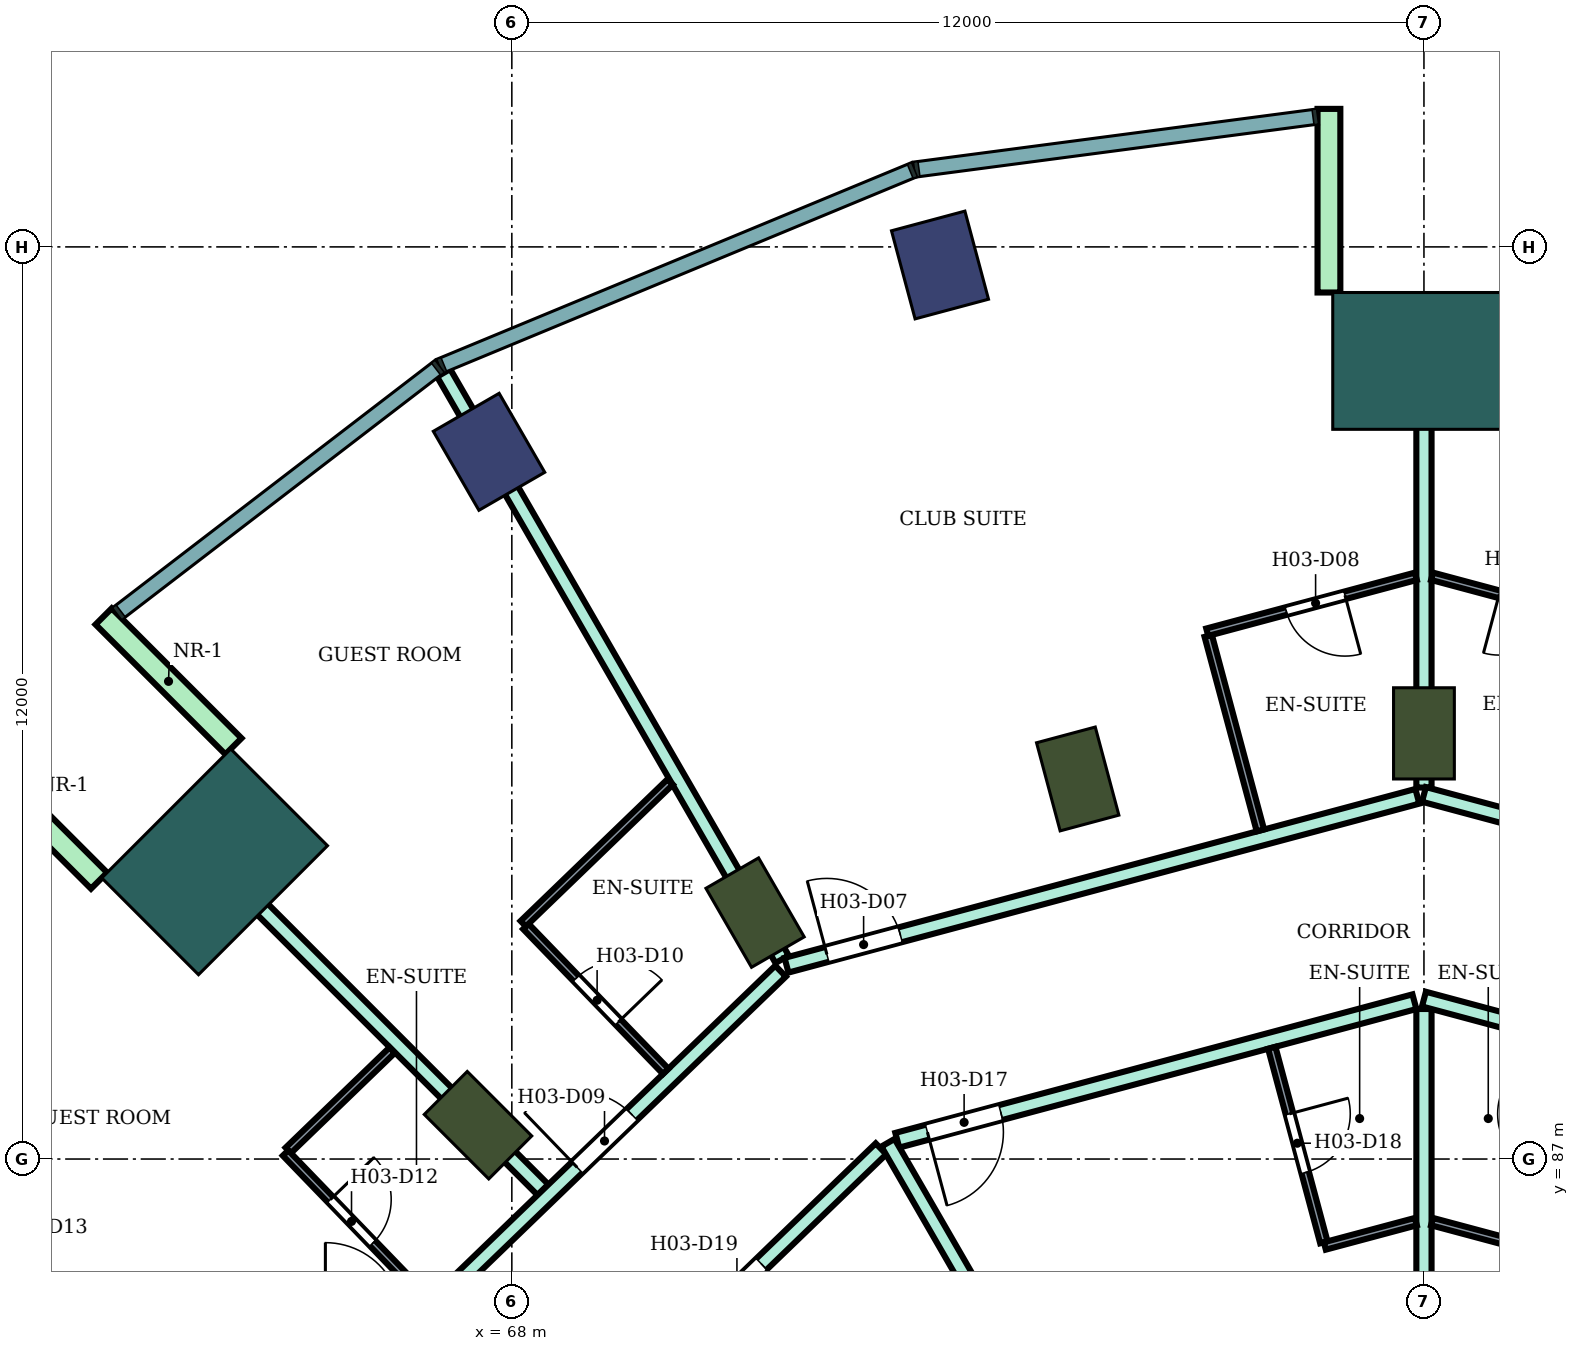
"""IFC4 building model, lengths in metres.
Left out: names, types, materials, properties, quantities, classifications, styles, units other than length and angle.
Written with IfcOpenShell. Run it as: python <this file> out.ifc"""

import sys

from ifc_helpers import new_model, si_unit, direction, frame, frame_2d, origin, origin_2d, place, context, subcontext, project, spatial, rectangle, extrude, element, fill, save


model = new_model("IFC4")
c1 = context("Model", 3, precision=1e-05, world=origin(), true_north=direction((0.0, 1.0)))
c2 = subcontext(c1, "Body", "Model", "MODEL_VIEW")
j1 = project(units=[si_unit("LENGTHUNIT", "METRE"), si_unit("PLANEANGLEUNIT", "RADIAN")], contexts=[c1])
p1 = place(None, origin())
s1 = spatial("IfcSite", under=j1, at=p1, CompositionType="ELEMENT")
p2 = place(p1, origin())
s2 = spatial("IfcBuilding", under=s1, at=p2, CompositionType="ELEMENT")
p3 = place(p2, frame((0.0, 0.0, 59.2)))
s3 = spatial("IfcBuildingStorey", under=s2, at=p3, CompositionType="ELEMENT", Elevation=59.2)
for number, where, z_axis, x_axis in (
    (1, (73.633, 98.762, 0.0), (0.0, 0.0, 1.0), (-0.259, 0.966, 0.0)),
    (2, (67.7, 96.304, 0.0), (0.0, 0.0, 1.0), (-0.5, 0.866, 0.0)),
):
    element("IfcColumn", number, at=place(p3, frame(where, z_axis=z_axis, x_axis=x_axis)), inside=s3, PredefinedType="COLUMN", context=c2, shape_type="SweptSolid", body=[
        extrude(rectangle(XDim=1.2, YDim=1.0, at=origin_2d()), origin(), (0.0, 0.0, 1.0), 3.8),
    ])
for number, where, z_axis, x_axis in (
    (3, (80.0, 92.6, 0.0), (0.0, 0.0, 1.0), (0.0, 1.0, 0.0)),
    (4, (75.445, 92.0, 0.0), (0.0, 0.0, 1.0), (-0.259, 0.966, 0.0)),
    (5, (71.2, 90.242, 0.0), (0.0, 0.0, 1.0), (-0.5, 0.866, 0.0)),
    (6, (67.555, 87.445, 0.0), (0.0, 0.0, 1.0), (-0.707, 0.707, 0.0)),
):
    element("IfcColumn", number, at=place(p3, frame(where, z_axis=z_axis, x_axis=x_axis)), inside=s3, PredefinedType="COLUMN", context=c2, shape_type="SweptSolid", body=[
        extrude(rectangle(XDim=1.2, YDim=0.8, at=origin_2d()), origin(), (0.0, 0.0, 1.0), 3.8),
    ])
for number, where, z_axis, x_axis in (
    (7, (80.0, 97.5, 0.0), (0.0, 0.0, 1.0), (0.0, 1.0, 0.0)),
    (8, (64.09, 90.91, 0.0), (0.0, 0.0, 1.0), (-0.707, 0.707, 0.0)),
):
    element("IfcColumn", number, at=place(p3, frame(where, z_axis=z_axis, x_axis=x_axis)), inside=s3, PredefinedType="COLUMN", context=c2, shape_type="SweptSolid", body=[
        extrude(rectangle(XDim=1.8, YDim=2.4, at=origin_2d()), origin(), (0.0, 0.0, 1.0), 3.8),
    ])
for number, where, z_axis, x_axis in (
    (9, (78.75, 98.4, 0.0), (0.0, 0.0, 1.0), (0.0, 1.0, 0.0)),
    (10, (64.338, 92.43, 0.0), (0.0, 0.0, 1.0), (-0.707, 0.707, 0.0)),
    (11, (62.57, 90.662, 0.0), (0.0, 0.0, 1.0), (-0.707, 0.707, 0.0)),
):
    element("IfcWall", number, at=place(p3, frame(where, z_axis=z_axis, x_axis=x_axis)), inside=s3, PredefinedType="NOTDEFINED", context=c2, shape_type="SweptSolid", body=[
        extrude(rectangle(XDim=2.416, YDim=0.3, at=frame_2d((1.208, 0.0))), origin(), (0.0, 0.0, 1.0), 3.8),
    ])
p4 = place(p3, frame((63.598, 91.408, 0.0), z_axis=(0.0, 0.0, 1.0), x_axis=(0.706999146394, -0.707214399597, 0.0)))
e12 = element("IfcWall", 12, at=p4, inside=s3, PredefinedType="PARTITIONING", context=c2, shape_type="SweptSolid", body=[
    extrude(rectangle(XDim=6.805, YDim=0.2, at=frame_2d((3.403, 0.0))), origin(), (0.0, 0.0, 1.0), 3.35),
])
p5 = place(p3, frame((66.797, 84.9, 0.0), z_axis=(0.0, 0.0, 1.0), x_axis=(0.719692092412, 0.694293376116, 0.0)))
e13 = element("IfcWall", 13, at=p5, inside=s3, PredefinedType="PARTITIONING", context=c2, shape_type="SweptSolid", body=[
    extrude(rectangle(XDim=6.584, YDim=0.2, at=frame_2d((3.292, 0.0))), origin(), (0.0, 0.0, 1.0), 3.35),
])
p6 = place(p5, frame((2.866, 0.0, 0.0)))
e14 = element("IfcOpeningElement", 14, at=p6, cuts=e13, PredefinedType="OPENING", context=c2, shape_type="SweptSolid", body=[
    extrude(rectangle(XDim=1.0, YDim=2.1, at=frame_2d((0.5, 1.05))), frame((0.0, 0.11, 0.0), z_axis=(0.0, -1.0, 0.0), x_axis=(1.0, 0.0, 0.0)), (0.0, 0.0, 1.0), 0.22),
])
p7 = place(p3, frame((67.103, 97.342, 0.0), z_axis=(0.0, 0.0, 1.0), x_axis=(0.499906738326, -0.866079241742, 0.0)))
e15 = element("IfcWall", 15, at=p7, inside=s3, PredefinedType="PARTITIONING", context=c2, shape_type="SweptSolid", body=[
    extrude(rectangle(XDim=8.907, YDim=0.2, at=frame_2d((4.454, 0.0))), origin(), (0.0, 0.0, 1.0), 3.35),
])
p8 = place(p3, frame((68.987, 83.4, 0.0), z_axis=(0.0, 0.0, 1.0), x_axis=(0.719547721855, 0.694442996922, 0.0)))
e16 = element("IfcWall", 16, at=p8, inside=s3, PredefinedType="PARTITIONING", context=c2, shape_type="SweptSolid", body=[
    extrude(rectangle(XDim=5.378, YDim=0.2, at=frame_2d((2.689, 0.0))), origin(), (0.0, 0.0, 1.0), 3.35),
])
p9 = place(p8, frame((2.294, 0.0, 0.0)))
e17 = element("IfcOpeningElement", 17, at=p9, cuts=e16, PredefinedType="OPENING", context=c2, shape_type="SweptSolid", body=[
    extrude(rectangle(XDim=0.9, YDim=2.1, at=frame_2d((0.45, 1.05))), frame((0.0, 0.11, 0.0), z_axis=(0.0, -1.0, 0.0), x_axis=(1.0, 0.0, 0.0)), (0.0, 0.0, 1.0), 0.22),
])
p10 = place(p3, frame((71.614, 89.55, 0.0), z_axis=(0.0, 0.0, 1.0), x_axis=(0.965967958589, 0.258661753994, 0.0)))
e18 = element("IfcWall", 18, at=p10, inside=s3, PredefinedType="PARTITIONING", context=c2, shape_type="SweptSolid", body=[
    extrude(rectangle(XDim=8.592, YDim=0.2, at=frame_2d((4.296, 0.0))), origin(), (0.0, 0.0, 1.0), 3.35),
])
p11 = place(p10, frame((0.55, 0.0, 0.0)))
e19 = element("IfcOpeningElement", 19, at=p11, cuts=e18, PredefinedType="OPENING", context=c2, shape_type="SweptSolid", body=[
    extrude(rectangle(XDim=1.0, YDim=2.1, at=frame_2d((0.5, 1.05))), frame((0.0, 0.11, 0.0), z_axis=(0.0, -1.0, 0.0), x_axis=(1.0, 0.0, 0.0)), (0.0, 0.0, 1.0), 0.22),
])
p12 = place(p3, frame((73.071, 87.247, 0.0), z_axis=(0.0, 0.0, 1.0), x_axis=(0.965931651205, 0.258797305243, 0.0)))
e20 = element("IfcWall", 20, at=p12, inside=s3, PredefinedType="PARTITIONING", context=c2, shape_type="SweptSolid", body=[
    extrude(rectangle(XDim=7.043, YDim=0.2, at=frame_2d((3.521, 0.0))), origin(), (0.0, 0.0, 1.0), 3.35),
])
p13 = place(p12, frame((0.41, 0.0, 0.0)))
e21 = element("IfcOpeningElement", 21, at=p13, cuts=e20, PredefinedType="OPENING", context=c2, shape_type="SweptSolid", body=[
    extrude(rectangle(XDim=1.0, YDim=2.1, at=frame_2d((0.5, 1.05))), frame((0.0, 0.11, 0.0), z_axis=(0.0, -1.0, 0.0), x_axis=(1.0, 0.0, 0.0)), (0.0, 0.0, 1.0), 0.22),
])
p14 = place(p3, frame((72.949, 87.214, 0.0), z_axis=(0.0, 0.0, 1.0), x_axis=(0.499927021214, -0.866067534006, 0.0)))
e22 = element("IfcWall", 22, at=p14, inside=s3, PredefinedType="PARTITIONING", context=c2, shape_type="SweptSolid", body=[
    extrude(rectangle(XDim=6.405, YDim=0.2, at=frame_2d((3.203, 0.0))), origin(), (0.0, 0.0, 1.0), 3.35),
])
p15 = place(p3, frame((80.0, 82.699, 0.0), z_axis=(0.0, 0.0, 1.0), x_axis=(0.0, 1.0, 0.0)))
e23 = element("IfcWall", 23, at=p15, inside=s3, PredefinedType="PARTITIONING", context=c2, shape_type="SweptSolid", body=[
    extrude(rectangle(XDim=6.275, YDim=0.2, at=frame_2d((3.138, 0.0))), origin(), (0.0, 0.0, 1.0), 3.35),
])
p16 = place(p3, frame((80.0, 89.104, 0.0), z_axis=(0.0, 0.0, 1.0), x_axis=(0.965856548257, -0.259077455964, 0.0)))
e24 = element("IfcWall", 24, at=p16, inside=s3, PredefinedType="PARTITIONING", context=c2, shape_type="SweptSolid", body=[
    extrude(rectangle(XDim=7.173, YDim=0.2, at=frame_2d((3.586, 0.0))), origin(), (0.0, 0.0, 1.0), 3.35),
])
p17 = place(p16, frame((5.763, 0.0, 0.0)))
e25 = element("IfcOpeningElement", 25, at=p17, cuts=e24, PredefinedType="OPENING", context=c2, shape_type="SweptSolid", body=[
    extrude(rectangle(XDim=1.0, YDim=2.1, at=frame_2d((0.5, 1.05))), frame((0.0, 0.11, 0.0), z_axis=(0.0, -1.0, 0.0), x_axis=(1.0, 0.0, 0.0)), (0.0, 0.0, 1.0), 0.22),
])
p18 = place(p3, frame((80.0, 91.887, 0.0), z_axis=(0.0, 0.0, 1.0), x_axis=(0.0, 1.0, 0.0)))
e26 = element("IfcWall", 26, at=p18, inside=s3, PredefinedType="PARTITIONING", context=c2, shape_type="SweptSolid", body=[
    extrude(rectangle(XDim=6.312, YDim=0.2, at=frame_2d((3.156, 0.0))), origin(), (0.0, 0.0, 1.0), 3.35),
])
p19 = place(p3, frame((80.0, 91.797, 0.0), z_axis=(0.0, 0.0, 1.0), x_axis=(0.965857042792, -0.259075612301, 0.0)))
e27 = element("IfcWall", 27, at=p19, inside=s3, PredefinedType="PARTITIONING", context=c2, shape_type="SweptSolid", body=[
    extrude(rectangle(XDim=8.602, YDim=0.2, at=frame_2d((4.301, 0.0))), origin(), (0.0, 0.0, 1.0), 3.35),
])
p20 = place(p19, frame((4.877, 0.0, 0.0)))
e28 = element("IfcOpeningElement", 28, at=p20, cuts=e27, PredefinedType="OPENING", context=c2, shape_type="SweptSolid", body=[
    extrude(rectangle(XDim=1.0, YDim=2.1, at=frame_2d((0.5, 1.05))), frame((0.0, 0.11, 0.0), z_axis=(0.0, -1.0, 0.0), x_axis=(1.0, 0.0, 0.0)), (0.0, 0.0, 1.0), 0.22),
])
p21 = place(p19, frame((2.817, 0.0, 0.0)))
e29 = element("IfcOpeningElement", 29, at=p21, cuts=e27, PredefinedType="OPENING", context=c2, shape_type="SweptSolid", body=[
    extrude(rectangle(XDim=1.0, YDim=2.1, at=frame_2d((0.5, 1.05))), frame((0.0, 0.11, 0.0), z_axis=(0.0, -1.0, 0.0), x_axis=(1.0, 0.0, 0.0)), (0.0, 0.0, 1.0), 0.22),
])
p22 = place(p3, frame((57.659, 87.899, 0.0), z_axis=(0.0, 0.0, 1.0), x_axis=(0.86602264145, -0.500004784474, 0.0)))
e30 = element("IfcWall", 30, at=p22, inside=s3, PredefinedType="PARTITIONING", context=c2, shape_type="SweptSolid", body=[
    extrude(rectangle(XDim=8.708, YDim=0.1, at=frame_2d((4.354, 0.0))), origin(), (0.0, 0.0, 1.0), 3.35),
])
p23 = place(p22, frame((3.929, 0.0, 0.0)))
e31 = element("IfcOpeningElement", 31, at=p23, cuts=e30, PredefinedType="OPENING", context=c2, shape_type="SweptSolid", body=[
    extrude(rectangle(XDim=0.9, YDim=2.1, at=frame_2d((0.45, 1.05))), frame((0.0, 0.06, 0.0), z_axis=(0.0, -1.0, 0.0), x_axis=(1.0, 0.0, 0.0)), (0.0, 0.0, 1.0), 0.12),
])
p24 = place(p3, frame((65.059, 87.114, 0.0), z_axis=(0.0, 0.0, 1.0), x_axis=(0.719715847356, 0.694268751324, 0.0)))
e32 = element("IfcWall", 32, at=p24, inside=s3, PredefinedType="PARTITIONING", context=c2, shape_type="SweptSolid", body=[
    extrude(rectangle(XDim=1.9, YDim=0.1, at=frame_2d((0.95, 0.0))), origin(), (0.0, 0.0, 1.0), 3.35),
])
p25 = place(p3, frame((65.023, 87.079, 0.0), z_axis=(0.0, 0.0, 1.0), x_axis=(0.694287838235, -0.719697434815, 0.0)))
e33 = element("IfcWall", 33, at=p25, inside=s3, PredefinedType="PARTITIONING", context=c2, shape_type="SweptSolid", body=[
    extrude(rectangle(XDim=2.7, YDim=0.1, at=frame_2d((1.35, 0.0))), origin(), (0.0, 0.0, 1.0), 3.35),
])
p26 = place(p25, frame((0.85, 0.0, 0.0)))
e34 = element("IfcOpeningElement", 34, at=p26, cuts=e33, PredefinedType="OPENING", context=c2, shape_type="SweptSolid", body=[
    extrude(rectangle(XDim=0.8, YDim=2.1, at=frame_2d((0.4, 1.05))), frame((0.0, 0.06, 0.0), z_axis=(0.0, -1.0, 0.0), x_axis=(1.0, 0.0, 0.0)), (0.0, 0.0, 1.0), 0.12),
])
p27 = place(p3, frame((68.185, 90.06, 0.0), z_axis=(0.0, 0.0, 1.0), x_axis=(0.69446127412, -0.719530081892, 0.0)))
e35 = element("IfcWall", 35, at=p27, inside=s3, PredefinedType="PARTITIONING", context=c2, shape_type="SweptSolid", body=[
    extrude(rectangle(XDim=2.649, YDim=0.1, at=frame_2d((1.324, 0.0))), origin(), (0.0, 0.0, 1.0), 3.35),
])
p28 = place(p27, frame((0.95, 0.0, 0.0)))
e36 = element("IfcOpeningElement", 36, at=p28, cuts=e35, PredefinedType="OPENING", context=c2, shape_type="SweptSolid", body=[
    extrude(rectangle(XDim=0.8, YDim=2.1, at=frame_2d((0.4, 1.05))), frame((0.0, 0.06, 0.0), z_axis=(0.0, -1.0, 0.0), x_axis=(1.0, 0.0, 0.0)), (0.0, 0.0, 1.0), 0.12),
])
p29 = place(p3, frame((68.15, 90.096, 0.0), z_axis=(0.0, 0.0, 1.0), x_axis=(0.719667544954, 0.694318820672, 0.0)))
e37 = element("IfcWall", 37, at=p29, inside=s3, PredefinedType="PARTITIONING", context=c2, shape_type="SweptSolid", body=[
    extrude(rectangle(XDim=2.687, YDim=0.1, at=frame_2d((1.344, 0.0))), origin(), (0.0, 0.0, 1.0), 3.35),
])
p30 = place(p3, frame((77.162, 93.883, 0.0), z_axis=(0.0, 0.0, 1.0), x_axis=(0.258998589493, -0.965877699629, 0.0)))
e38 = element("IfcWall", 38, at=p30, inside=s3, PredefinedType="PARTITIONING", context=c2, shape_type="SweptSolid", body=[
    extrude(rectangle(XDim=2.65, YDim=0.1, at=frame_2d((1.325, 0.0))), origin(), (0.0, 0.0, 1.0), 3.35),
])
p31 = place(p3, frame((77.149, 93.931, 0.0), z_axis=(0.0, 0.0, 1.0), x_axis=(0.965916219953, 0.258854893776, 0.0)))
e39 = element("IfcWall", 39, at=p31, inside=s3, PredefinedType="PARTITIONING", context=c2, shape_type="SweptSolid", body=[
    extrude(rectangle(XDim=2.842, YDim=0.1, at=frame_2d((1.421, 0.0))), origin(), (0.0, 0.0, 1.0), 3.35),
])
p32 = place(p31, frame((1.076, 0.0, 0.0)))
e40 = element("IfcOpeningElement", 40, at=p32, cuts=e39, PredefinedType="OPENING", context=c2, shape_type="SweptSolid", body=[
    extrude(rectangle(XDim=0.8, YDim=2.1, at=frame_2d((0.4, 1.05))), frame((0.0, 0.06, 0.0), z_axis=(0.0, -1.0, 0.0), x_axis=(1.0, 0.0, 0.0)), (0.0, 0.0, 1.0), 0.12),
])
p33 = place(p3, frame((77.998, 88.463, 0.0), z_axis=(0.0, 0.0, 1.0), x_axis=(0.258677737588, -0.965963678446, 0.0)))
e41 = element("IfcWall", 41, at=p33, inside=s3, PredefinedType="PARTITIONING", context=c2, shape_type="SweptSolid", body=[
    extrude(rectangle(XDim=2.649, YDim=0.1, at=frame_2d((1.325, 0.0))), origin(), (0.0, 0.0, 1.0), 3.35),
])
p34 = place(p33, frame((0.9, 0.0, 0.0)))
e42 = element("IfcOpeningElement", 42, at=p34, cuts=e41, PredefinedType="OPENING", context=c2, shape_type="SweptSolid", body=[
    extrude(rectangle(XDim=0.8, YDim=2.1, at=frame_2d((0.4, 1.05))), frame((0.0, 0.06, 0.0), z_axis=(0.0, -1.0, 0.0), x_axis=(1.0, 0.0, 0.0)), (0.0, 0.0, 1.0), 0.12),
])
p35 = place(p3, frame((78.696, 85.856, 0.0), z_axis=(0.0, 0.0, 1.0), x_axis=(0.966002513606, 0.258532674351, 0.0)))
e43 = element("IfcWall", 43, at=p35, inside=s3, PredefinedType="PARTITIONING", context=c2, shape_type="SweptSolid", body=[
    extrude(rectangle(XDim=1.24, YDim=0.1, at=frame_2d((0.62, 0.0))), origin(), (0.0, 0.0, 1.0), 3.35),
])
p36 = place(p3, frame((80.106, 86.177, 0.0), z_axis=(0.0, 0.0, 1.0), x_axis=(0.966002973184, -0.258530957139, 0.0)))
e44 = element("IfcWall", 44, at=p36, inside=s3, PredefinedType="PARTITIONING", context=c2, shape_type="SweptSolid", body=[
    extrude(rectangle(XDim=1.19, YDim=0.1, at=frame_2d((0.595, 0.0))), origin(), (0.0, 0.0, 1.0), 3.35),
])
p37 = place(p3, frame((80.106, 94.667, 0.0), z_axis=(0.0, 0.0, 1.0), x_axis=(0.965904298007, -0.258899376382, 0.0)))
e45 = element("IfcWall", 45, at=p37, inside=s3, PredefinedType="PARTITIONING", context=c2, shape_type="SweptSolid", body=[
    extrude(rectangle(XDim=2.69, YDim=0.1, at=frame_2d((1.345, 0.0))), origin(), (0.0, 0.0, 1.0), 3.35),
])
p38 = place(p37, frame((0.915, 0.0, 0.0)))
e46 = element("IfcOpeningElement", 46, at=p38, cuts=e45, PredefinedType="OPENING", context=c2, shape_type="SweptSolid", body=[
    extrude(rectangle(XDim=0.8, YDim=2.1, at=frame_2d((0.4, 1.05))), frame((0.0, 0.06, 0.0), z_axis=(0.0, -1.0, 0.0), x_axis=(1.0, 0.0, 0.0)), (0.0, 0.0, 1.0), 0.12),
])
p39 = place(p38, frame((0.8, 0.0, 0.0), z_axis=(0.0, 0.0, 1.0), x_axis=(-1.0, 0.0, 0.0)))
e47 = element("IfcDoor", 47, at=p39, inside=s3, OperationType="SINGLE_SWING_RIGHT", PredefinedType="DOOR", context=c2, shape_type="SweptSolid", body=[
    extrude(rectangle(XDim=0.8, YDim=2.1, at=frame_2d((0.4, 1.05))), frame((0.0, 0.025, 0.0), z_axis=(0.0, -1.0, 0.0), x_axis=(1.0, 0.0, 0.0)), (0.0, 0.0, 1.0), 0.05),
])
fill(e46, e47)
p40 = place(p11, origin())
e48 = element("IfcDoor", 48, at=p40, inside=s3, OperationType="SINGLE_SWING_LEFT", PredefinedType="DOOR", context=c2, shape_type="SweptSolid", body=[
    extrude(rectangle(XDim=1.0, YDim=2.1, at=frame_2d((0.5, 1.05))), frame((0.0, 0.025, 0.0), z_axis=(0.0, -1.0, 0.0), x_axis=(1.0, 0.0, 0.0)), (0.0, 0.0, 1.0), 0.05),
])
fill(e19, e48)
p41 = place(p32, frame((0.8, 0.0, 0.0), z_axis=(0.0, 0.0, 1.0), x_axis=(-1.0, 0.0, 0.0)))
e49 = element("IfcDoor", 49, at=p41, inside=s3, OperationType="SINGLE_SWING_LEFT", PredefinedType="DOOR", context=c2, shape_type="SweptSolid", body=[
    extrude(rectangle(XDim=0.8, YDim=2.1, at=frame_2d((0.4, 1.05))), frame((0.0, 0.025, 0.0), z_axis=(0.0, -1.0, 0.0), x_axis=(1.0, 0.0, 0.0)), (0.0, 0.0, 1.0), 0.05),
])
fill(e40, e49)
p42 = place(p6, origin())
e50 = element("IfcDoor", 50, at=p42, inside=s3, OperationType="SINGLE_SWING_LEFT", PredefinedType="DOOR", context=c2, shape_type="SweptSolid", body=[
    extrude(rectangle(XDim=1.0, YDim=2.1, at=frame_2d((0.5, 1.05))), frame((0.0, 0.025, 0.0), z_axis=(0.0, -1.0, 0.0), x_axis=(1.0, 0.0, 0.0)), (0.0, 0.0, 1.0), 0.05),
])
fill(e14, e50)
p43 = place(p28, origin())
e51 = element("IfcDoor", 51, at=p43, inside=s3, OperationType="SINGLE_SWING_RIGHT", PredefinedType="DOOR", context=c2, shape_type="SweptSolid", body=[
    extrude(rectangle(XDim=0.8, YDim=2.1, at=frame_2d((0.4, 1.05))), frame((0.0, 0.025, 0.0), z_axis=(0.0, -1.0, 0.0), x_axis=(1.0, 0.0, 0.0)), (0.0, 0.0, 1.0), 0.05),
])
fill(e36, e51)
p44 = place(p26, origin())
e52 = element("IfcDoor", 52, at=p44, inside=s3, OperationType="SINGLE_SWING_LEFT", PredefinedType="DOOR", context=c2, shape_type="SweptSolid", body=[
    extrude(rectangle(XDim=0.8, YDim=2.1, at=frame_2d((0.4, 1.05))), frame((0.0, 0.025, 0.0), z_axis=(0.0, -1.0, 0.0), x_axis=(1.0, 0.0, 0.0)), (0.0, 0.0, 1.0), 0.05),
])
fill(e34, e52)
p45 = place(p13, frame((1.0, 0.0, 0.0), z_axis=(0.0, 0.0, 1.0), x_axis=(-1.0, 0.0, 0.0)))
e53 = element("IfcDoor", 53, at=p45, inside=s3, OperationType="SINGLE_SWING_RIGHT", PredefinedType="DOOR", context=c2, shape_type="SweptSolid", body=[
    extrude(rectangle(XDim=1.0, YDim=2.1, at=frame_2d((0.5, 1.05))), frame((0.0, 0.025, 0.0), z_axis=(0.0, -1.0, 0.0), x_axis=(1.0, 0.0, 0.0)), (0.0, 0.0, 1.0), 0.05),
])
fill(e21, e53)
p46 = place(p34, origin())
e54 = element("IfcDoor", 54, at=p46, inside=s3, OperationType="SINGLE_SWING_LEFT", PredefinedType="DOOR", context=c2, shape_type="SweptSolid", body=[
    extrude(rectangle(XDim=0.8, YDim=2.1, at=frame_2d((0.4, 1.05))), frame((0.0, 0.025, 0.0), z_axis=(0.0, -1.0, 0.0), x_axis=(1.0, 0.0, 0.0)), (0.0, 0.0, 1.0), 0.05),
])
fill(e42, e54)
p47 = place(p9, frame((0.9, 0.0, 0.0), z_axis=(0.0, 0.0, 1.0), x_axis=(-1.0, 0.0, 0.0)))
e55 = element("IfcDoor", 55, at=p47, inside=s3, OperationType="SINGLE_SWING_RIGHT", PredefinedType="DOOR", context=c2, shape_type="SweptSolid", body=[
    extrude(rectangle(XDim=0.9, YDim=2.1, at=frame_2d((0.45, 1.05))), frame((0.0, 0.025, 0.0), z_axis=(0.0, -1.0, 0.0), x_axis=(1.0, 0.0, 0.0)), (0.0, 0.0, 1.0), 0.05),
])
fill(e17, e55)
save(model, sys.argv[1])
